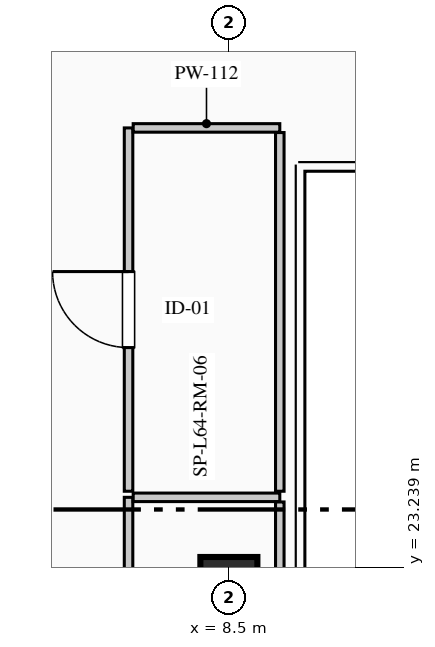
"""IFC4 building model, lengths in metres.
Left out: names, types, materials, properties, quantities, classifications, styles, units other than length and angle.
Written with IfcOpenShell. Run it as: python <this file> out.ifc"""

import sys

from ifc_helpers import new_model, si_unit, direction, frame, frame_2d, origin, origin_2d, place, context, subcontext, project, spatial, rectangle, extrude, element, fill, save


model = new_model("IFC4")
c1 = context("Model", 3, precision=1e-05, world=origin(), true_north=direction((0.0, 1.0)))
c2 = subcontext(c1, "Body", "Model", "MODEL_VIEW")
j1 = project(units=[si_unit("LENGTHUNIT", "METRE"), si_unit("PLANEANGLEUNIT", "RADIAN")], contexts=[c1])
p1 = place(None, origin())
s1 = spatial("IfcSite", under=j1, at=p1, CompositionType="ELEMENT")
p2 = place(p1, origin())
s2 = spatial("IfcBuilding", under=s1, at=p2, CompositionType="ELEMENT")
p3 = place(p2, frame((0.0, 0.0, 268.55)))
s3 = spatial("IfcBuildingStorey", under=s2, at=p3, CompositionType="ELEMENT", Elevation=268.55)
p4 = place(p3, frame((8.5, 23.0, 0.0), z_axis=(0.0, 0.0, 1.0), x_axis=(1.0, 0.0, 0.0)))
e1 = element("IfcColumn", 1, at=p4, inside=s3, PredefinedType="COLUMN", context=c2, shape_type="SweptSolid", body=[
    extrude(rectangle(XDim=0.75, YDim=0.75, at=origin_2d()), origin(), (0.0, 0.0, 1.0), 3.95),
])
p5 = place(p3, frame((6.133, 4.42, 0.0), z_axis=(0.0, 0.0, 1.0), x_axis=(-0.089522678378, 0.995984784048, 0.0)))
e2 = element("IfcWall", 2, at=p5, inside=s3, PredefinedType="STANDARD", context=c2, shape_type="SweptSolid", body=[
    extrude(rectangle(XDim=37.31, YDim=0.24, at=frame_2d((18.655, 0.0))), origin(), (0.0, 0.0, 1.0), 3.7),
])
p6 = place(p5, frame((10.246, 0.0, 0.9)))
e3 = element("IfcOpeningElement", 3, at=p6, cuts=e2, PredefinedType="OPENING", context=c2, shape_type="SweptSolid", body=[
    extrude(rectangle(XDim=1.65, YDim=1.95, at=frame_2d((0.825, 0.975))), frame((0.0, 0.13, 0.0), z_axis=(0.0, -1.0, 0.0), x_axis=(1.0, 0.0, 0.0)), (0.0, 0.0, 1.0), 0.26),
])
p7 = place(p3, frame((7.18, 18.02, 0.0), z_axis=(0.0, 0.0, 1.0), x_axis=(0.0, 1.0, 0.0)))
e4 = element("IfcWall", 4, at=p7, inside=s3, PredefinedType="PARTITIONING", context=c2, shape_type="SweptSolid", body=[
    extrude(rectangle(XDim=6.14, YDim=0.112, at=frame_2d((3.07, 0.0))), origin(), (0.0, 0.0, 1.0), 3.7),
])
p8 = place(p7, frame((2.57, 0.0, 0.0)))
e5 = element("IfcOpeningElement", 5, at=p8, cuts=e4, PredefinedType="OPENING", context=c2, shape_type="SweptSolid", body=[
    extrude(rectangle(XDim=1.0, YDim=2.15, at=frame_2d((0.5, 1.075))), frame((0.0, 0.066, 0.0), z_axis=(0.0, -1.0, 0.0), x_axis=(1.0, 0.0, 0.0)), (0.0, 0.0, 1.0), 0.132),
])
p9 = place(p3, frame((7.241, 24.16, 0.0), z_axis=(0.0, 0.0, 1.0), x_axis=(1.0, 0.0, 0.0)))
e6 = element("IfcWall", 6, at=p9, inside=s3, PredefinedType="PARTITIONING", context=c2, shape_type="SweptSolid", body=[
    extrude(rectangle(XDim=1.929, YDim=0.112, at=frame_2d((0.964, 0.0))), origin(), (0.0, 0.0, 1.0), 3.7),
])
p10 = place(p3, frame((9.17, 24.099, 0.0), z_axis=(0.0, 0.0, 1.0), x_axis=(0.0, -1.0, 0.0)))
e7 = element("IfcWall", 7, at=p10, inside=s3, PredefinedType="PARTITIONING", context=c2, shape_type="SweptSolid", body=[
    extrude(rectangle(XDim=4.349, YDim=0.112, at=frame_2d((2.175, 0.0))), origin(), (0.0, 0.0, 1.0), 3.285),
])
p11 = place(p3, frame((7.18, 24.24, 0.0), z_axis=(0.0, 0.0, 1.0), x_axis=(0.0, 1.0, 0.0)))
e8 = element("IfcWall", 8, at=p11, inside=s3, PredefinedType="PARTITIONING", context=c2, shape_type="SweptSolid", body=[
    extrude(rectangle(XDim=4.78, YDim=0.112, at=frame_2d((2.39, 0.0))), origin(), (0.0, 0.0, 1.0), 3.7),
])
p12 = place(p11, frame((1.89, 0.0, 0.0)))
e9 = element("IfcOpeningElement", 9, at=p12, cuts=e8, PredefinedType="OPENING", context=c2, shape_type="SweptSolid", body=[
    extrude(rectangle(XDim=1.0, YDim=2.15, at=frame_2d((0.5, 1.075))), frame((0.0, 0.066, 0.0), z_axis=(0.0, -1.0, 0.0), x_axis=(1.0, 0.0, 0.0)), (0.0, 0.0, 1.0), 0.132),
])
p13 = place(p3, frame((7.241, 29.02, 0.0), z_axis=(0.0, 0.0, 1.0), x_axis=(1.0, 0.0, 0.0)))
e10 = element("IfcWall", 10, at=p13, inside=s3, PredefinedType="PARTITIONING", context=c2, shape_type="SweptSolid", body=[
    extrude(rectangle(XDim=1.929, YDim=0.112, at=frame_2d((0.964, 0.0))), origin(), (0.0, 0.0, 1.0), 3.7),
])
p14 = place(p3, frame((9.17, 28.959, 0.0), z_axis=(0.0, 0.0, 1.0), x_axis=(0.0, -1.0, 0.0)))
e11 = element("IfcWall", 11, at=p14, inside=s3, PredefinedType="PARTITIONING", context=c2, shape_type="SweptSolid", body=[
    extrude(rectangle(XDim=4.719, YDim=0.112, at=frame_2d((2.359, 0.0))), origin(), (0.0, 0.0, 1.0), 3.285),
])
p15 = place(p12, origin())
e12 = element("IfcDoor", 12, at=p15, inside=s3, OperationType="SINGLE_SWING_RIGHT", PredefinedType="DOOR", context=c2, shape_type="SweptSolid", body=[
    extrude(rectangle(XDim=1.0, YDim=2.15, at=frame_2d((0.5, 1.075))), frame((0.0, 0.025, 0.0), z_axis=(0.0, -1.0, 0.0), x_axis=(1.0, 0.0, 0.0)), (0.0, 0.0, 1.0), 0.05),
])
fill(e9, e12)
save(model, sys.argv[1])
